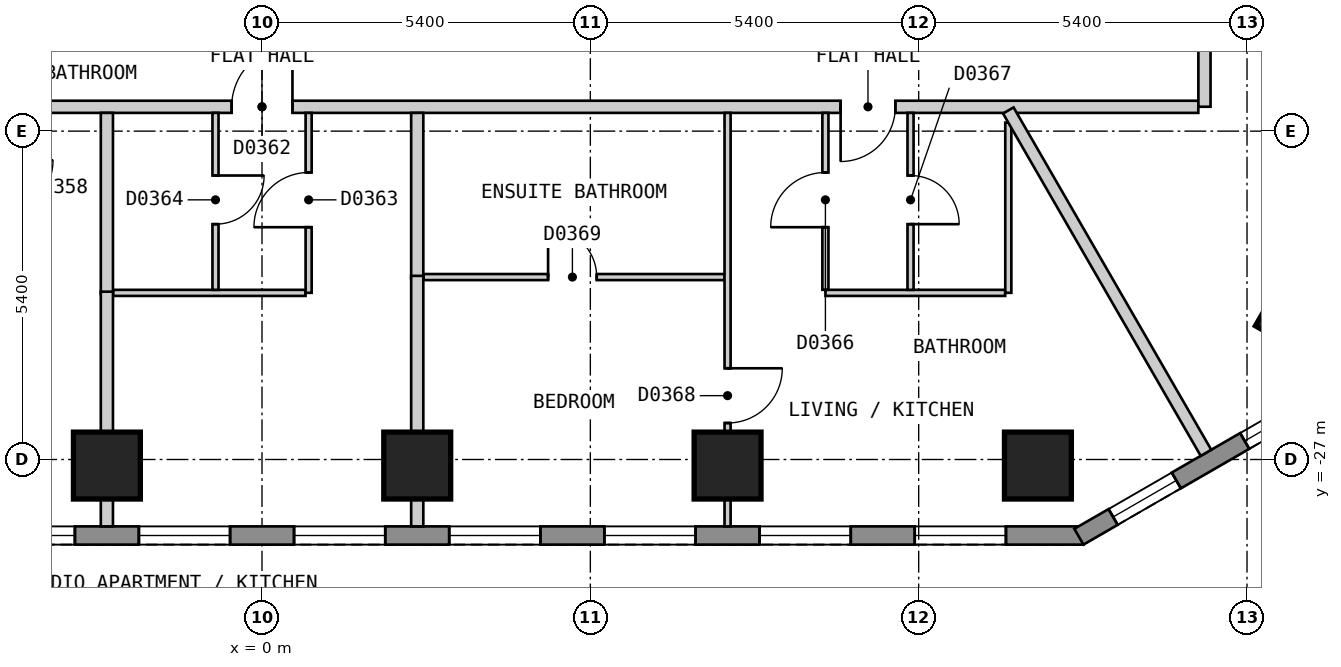
"""IFC4 building model, lengths in metres.
Left out: names, types, materials, properties, quantities, classifications, styles, units other than length and angle.
Written with IfcOpenShell. Run it as: python <this file> out.ifc"""

import sys

from ifc_helpers import new_model, si_unit, direction, frame, frame_2d, origin, origin_2d, place, context, subcontext, project, spatial, polyline, rectangle, outline, extrude, element, fill, save


model = new_model("IFC4")
c1 = context("Model", 3, precision=1e-05, world=origin(), true_north=direction((0.0, 1.0)))
c2 = subcontext(c1, "Body", "Model", "MODEL_VIEW")
j1 = project(units=[si_unit("LENGTHUNIT", "METRE"), si_unit("PLANEANGLEUNIT", "RADIAN")], contexts=[c1])
p1 = place(None, origin())
s1 = spatial("IfcSite", under=j1, at=p1, CompositionType="ELEMENT")
p2 = place(p1, origin())
s2 = spatial("IfcBuilding", under=s1, at=p2, CompositionType="ELEMENT")
p3 = place(p2, frame((0.0, 0.0, 59.4)))
s3 = spatial("IfcBuildingStorey", under=s2, at=p3, CompositionType="ELEMENT", Elevation=59.4)
for number, where, z_axis, x_axis in (
    (1, (-2.551, -27.1, 0.0), (0.0, 0.0, 1.0), (1.0, 0.0, 0.0)),
    (2, (2.553, -27.1, 0.0), (0.0, 0.0, 1.0), (1.0, 0.0, 0.0)),
    (3, (7.657, -27.1, 0.0), (0.0, 0.0, 1.0), (1.0, 0.0, 0.0)),
    (4, (12.761, -27.1, 0.0), (0.0, 0.0, 1.0), (1.0, 0.0, 0.0)),
    (5, (17.09, -24.6, 0.0), (0.0, 0.0, 1.0), (0.5, 0.866, 0.0)),
):
    element("IfcColumn", number, at=place(p3, frame(where, z_axis=z_axis, x_axis=x_axis)), inside=s3, PredefinedType="COLUMN", context=c2, shape_type="SweptSolid", body=[
        extrude(rectangle(XDim=1.1, YDim=1.1, at=origin_2d()), origin(), (0.0, 0.0, 1.0), 3.0),
    ])
p4 = place(p3, frame((-13.51, -28.25, 0.0), z_axis=(0.0, 0.0, 1.0), x_axis=(1.0, 0.0, 0.0)))
e6 = element("IfcWall", 6, at=p4, inside=s3, PredefinedType="SOLIDWALL", context=c2, shape_type="SweptSolid", body=[
    extrude(outline(polyline([(0.0, -0.15), (27.02, -0.15), (26.94, 0.15), (0.08, 0.15), (0.0, -0.15)])), origin(), (0.0, 0.0, 1.0), 2.6),
])
p5 = place(p4, frame((1.277, 0.0, 0.15)))
e7 = element("IfcOpeningElement", 7, at=p5, cuts=e6, PredefinedType="OPENING", context=c2, shape_type="SweptSolid", body=[
    extrude(rectangle(XDim=1.5, YDim=2.1, at=frame_2d((0.75, 1.05))), frame((0.0, 0.16, 0.0), z_axis=(0.0, -1.0, 0.0), x_axis=(1.0, 0.0, 0.0)), (0.0, 0.0, 1.0), 0.32),
])
p6 = place(p4, frame((3.829, 0.0, 0.15)))
e8 = element("IfcOpeningElement", 8, at=p6, cuts=e6, PredefinedType="OPENING", context=c2, shape_type="SweptSolid", body=[
    extrude(rectangle(XDim=1.5, YDim=2.1, at=frame_2d((0.75, 1.05))), frame((0.0, 0.16, 0.0), z_axis=(0.0, -1.0, 0.0), x_axis=(1.0, 0.0, 0.0)), (0.0, 0.0, 1.0), 0.32),
])
p7 = place(p4, frame((6.381, 0.0, 0.15)))
e9 = element("IfcOpeningElement", 9, at=p7, cuts=e6, PredefinedType="OPENING", context=c2, shape_type="SweptSolid", body=[
    extrude(rectangle(XDim=1.5, YDim=2.1, at=frame_2d((0.75, 1.05))), frame((0.0, 0.16, 0.0), z_axis=(0.0, -1.0, 0.0), x_axis=(1.0, 0.0, 0.0)), (0.0, 0.0, 1.0), 0.32),
])
p8 = place(p4, frame((8.933, 0.0, 0.15)))
e10 = element("IfcOpeningElement", 10, at=p8, cuts=e6, PredefinedType="OPENING", context=c2, shape_type="SweptSolid", body=[
    extrude(rectangle(XDim=1.5, YDim=2.1, at=frame_2d((0.75, 1.05))), frame((0.0, 0.16, 0.0), z_axis=(0.0, -1.0, 0.0), x_axis=(1.0, 0.0, 0.0)), (0.0, 0.0, 1.0), 0.32),
])
p9 = place(p4, frame((11.485, 0.0, 0.15)))
e11 = element("IfcOpeningElement", 11, at=p9, cuts=e6, PredefinedType="OPENING", context=c2, shape_type="SweptSolid", body=[
    extrude(rectangle(XDim=1.5, YDim=2.1, at=frame_2d((0.75, 1.05))), frame((0.0, 0.16, 0.0), z_axis=(0.0, -1.0, 0.0), x_axis=(1.0, 0.0, 0.0)), (0.0, 0.0, 1.0), 0.32),
])
p10 = place(p4, frame((14.037, 0.0, 0.15)))
e12 = element("IfcOpeningElement", 12, at=p10, cuts=e6, PredefinedType="OPENING", context=c2, shape_type="SweptSolid", body=[
    extrude(rectangle(XDim=1.5, YDim=2.1, at=frame_2d((0.75, 1.05))), frame((0.0, 0.16, 0.0), z_axis=(0.0, -1.0, 0.0), x_axis=(1.0, 0.0, 0.0)), (0.0, 0.0, 1.0), 0.32),
])
p11 = place(p4, frame((16.589, 0.0, 0.15)))
e13 = element("IfcOpeningElement", 13, at=p11, cuts=e6, PredefinedType="OPENING", context=c2, shape_type="SweptSolid", body=[
    extrude(rectangle(XDim=1.5, YDim=2.1, at=frame_2d((0.75, 1.05))), frame((0.0, 0.16, 0.0), z_axis=(0.0, -1.0, 0.0), x_axis=(1.0, 0.0, 0.0)), (0.0, 0.0, 1.0), 0.32),
])
p12 = place(p4, frame((19.141, 0.0, 0.15)))
e14 = element("IfcOpeningElement", 14, at=p12, cuts=e6, PredefinedType="OPENING", context=c2, shape_type="SweptSolid", body=[
    extrude(rectangle(XDim=1.5, YDim=2.1, at=frame_2d((0.75, 1.05))), frame((0.0, 0.16, 0.0), z_axis=(0.0, -1.0, 0.0), x_axis=(1.0, 0.0, 0.0)), (0.0, 0.0, 1.0), 0.32),
])
p13 = place(p4, frame((21.693, 0.0, 0.15)))
e15 = element("IfcOpeningElement", 15, at=p13, cuts=e6, PredefinedType="OPENING", context=c2, shape_type="SweptSolid", body=[
    extrude(rectangle(XDim=1.5, YDim=2.1, at=frame_2d((0.75, 1.05))), frame((0.0, 0.16, 0.0), z_axis=(0.0, -1.0, 0.0), x_axis=(1.0, 0.0, 0.0)), (0.0, 0.0, 1.0), 0.32),
])
p14 = place(p4, frame((24.245, 0.0, 0.15)))
e16 = element("IfcOpeningElement", 16, at=p14, cuts=e6, PredefinedType="OPENING", context=c2, shape_type="SweptSolid", body=[
    extrude(rectangle(XDim=1.5, YDim=2.1, at=frame_2d((0.75, 1.05))), frame((0.0, 0.16, 0.0), z_axis=(0.0, -1.0, 0.0), x_axis=(1.0, 0.0, 0.0)), (0.0, 0.0, 1.0), 0.32),
])
p15 = place(p3, frame((13.435, -28.27, 0.0), z_axis=(0.0, 0.0, 1.0), x_axis=(0.866010750942, 0.50002537861, 0.0)))
e17 = element("IfcWall", 17, at=p15, inside=s3, PredefinedType="SOLIDWALL", context=c2, shape_type="SweptSolid", body=[
    extrude(outline(polyline([(0.0, -0.15), (5.0, -0.15), (4.919, 0.15), (0.08, 0.15), (0.0, -0.15)])), origin(), (0.0, 0.0, 1.0), 2.6),
])
p16 = place(p15, frame((0.65, 0.0, 0.15)))
e18 = element("IfcOpeningElement", 18, at=p16, cuts=e17, PredefinedType="OPENING", context=c2, shape_type="SweptSolid", body=[
    extrude(rectangle(XDim=1.2, YDim=2.1, at=frame_2d((0.6, 1.05))), frame((0.0, 0.16, 0.0), z_axis=(0.0, -1.0, 0.0), x_axis=(1.0, 0.0, 0.0)), (0.0, 0.0, 1.0), 0.32),
])
p17 = place(p15, frame((3.149, 0.0, 0.15)))
e19 = element("IfcOpeningElement", 19, at=p17, cuts=e17, PredefinedType="OPENING", context=c2, shape_type="SweptSolid", body=[
    extrude(rectangle(XDim=1.2, YDim=2.1, at=frame_2d((0.6, 1.05))), frame((0.0, 0.16, 0.0), z_axis=(0.0, -1.0, 0.0), x_axis=(1.0, 0.0, 0.0)), (0.0, 0.0, 1.0), 0.32),
])
p18 = place(p3, frame((-15.4, -21.2, 0.0), z_axis=(0.0, 0.0, 1.0), x_axis=(1.0, 0.0, 0.0)))
e20 = element("IfcWall", 20, at=p18, inside=s3, PredefinedType="PARTITIONING", context=c2, shape_type="SweptSolid", body=[
    extrude(rectangle(XDim=30.799, YDim=0.2, at=frame_2d((15.399, 0.0))), origin(), (0.0, 0.0, 1.0), 2.6),
])
p19 = place(p18, frame((9.797, 0.0, 0.0)))
e21 = element("IfcOpeningElement", 21, at=p19, cuts=e20, PredefinedType="OPENING", context=c2, shape_type="SweptSolid", body=[
    extrude(rectangle(XDim=1.0, YDim=2.1, at=frame_2d((0.5, 1.05))), frame((0.0, 0.11, 0.0), z_axis=(0.0, -1.0, 0.0), x_axis=(1.0, 0.0, 0.0)), (0.0, 0.0, 1.0), 0.22),
])
p20 = place(p18, frame((14.901, 0.0, 0.0)))
e22 = element("IfcOpeningElement", 22, at=p20, cuts=e20, PredefinedType="OPENING", context=c2, shape_type="SweptSolid", body=[
    extrude(rectangle(XDim=1.0, YDim=2.1, at=frame_2d((0.5, 1.05))), frame((0.0, 0.11, 0.0), z_axis=(0.0, -1.0, 0.0), x_axis=(1.0, 0.0, 0.0)), (0.0, 0.0, 1.0), 0.22),
])
p21 = place(p18, frame((24.916, 0.0, 0.0)))
e23 = element("IfcOpeningElement", 23, at=p21, cuts=e20, PredefinedType="OPENING", context=c2, shape_type="SweptSolid", body=[
    extrude(rectangle(XDim=0.9, YDim=2.1, at=frame_2d((0.45, 1.05))), frame((0.0, 0.11, 0.0), z_axis=(0.0, -1.0, 0.0), x_axis=(1.0, 0.0, 0.0)), (0.0, 0.0, 1.0), 0.22),
])
p22 = place(p3, frame((15.5, -21.199, 0.0), z_axis=(0.0, 0.0, 1.0), x_axis=(0.0, 1.0, 0.0)))
e24 = element("IfcWall", 24, at=p22, inside=s3, PredefinedType="PARTITIONING", context=c2, shape_type="SweptSolid", body=[
    extrude(rectangle(XDim=7.575, YDim=0.2, at=frame_2d((3.788, 0.0))), origin(), (0.0, 0.0, 1.0), 2.6),
])
p23 = place(p22, frame((1.288, 0.0, 0.0)))
e25 = element("IfcOpeningElement", 25, at=p23, cuts=e24, PredefinedType="OPENING", context=c2, shape_type="SweptSolid", body=[
    extrude(rectangle(XDim=0.8, YDim=2.1, at=frame_2d((0.4, 1.05))), frame((0.0, 0.11, 0.0), z_axis=(0.0, -1.0, 0.0), x_axis=(1.0, 0.0, 0.0)), (0.0, 0.0, 1.0), 0.22),
])
p24 = place(p3, frame((9.266, -21.3, 0.0), z_axis=(0.0, 0.0, 1.0), x_axis=(0.0, -1.0, 0.0)))
e26 = element("IfcWall", 26, at=p24, inside=s3, PredefinedType="PARTITIONING", context=c2, shape_type="SweptSolid", body=[
    extrude(rectangle(XDim=2.909, YDim=0.1, at=frame_2d((1.455, 0.0))), origin(), (0.0, 0.0, 1.0), 2.6),
])
p25 = place(p24, frame((0.98, 0.0, 0.0)))
e27 = element("IfcOpeningElement", 27, at=p25, cuts=e26, PredefinedType="OPENING", context=c2, shape_type="SweptSolid", body=[
    extrude(rectangle(XDim=0.9, YDim=2.1, at=frame_2d((0.45, 1.05))), frame((0.0, 0.06, 0.0), z_axis=(0.0, -1.0, 0.0), x_axis=(1.0, 0.0, 0.0)), (0.0, 0.0, 1.0), 0.12),
])
p26 = place(p3, frame((2.653, -24.0, 0.0), z_axis=(0.0, 0.0, 1.0), x_axis=(1.0, 0.0, 0.0)))
e28 = element("IfcWall", 28, at=p26, inside=s3, PredefinedType="PARTITIONING", context=c2, shape_type="SweptSolid", body=[
    extrude(rectangle(XDim=4.954, YDim=0.1, at=frame_2d((2.477, 0.0))), origin(), (0.0, 0.0, 1.0), 2.6),
])
p27 = place(p26, frame((2.052, 0.0, 0.0)))
e29 = element("IfcOpeningElement", 29, at=p27, cuts=e28, PredefinedType="OPENING", context=c2, shape_type="SweptSolid", body=[
    extrude(rectangle(XDim=0.8, YDim=2.1, at=frame_2d((0.4, 1.05))), frame((0.0, 0.06, 0.0), z_axis=(0.0, -1.0, 0.0), x_axis=(1.0, 0.0, 0.0)), (0.0, 0.0, 1.0), 0.12),
])
p28 = place(p3, frame((-2.451, -24.26, 0.0), z_axis=(0.0, 0.0, 1.0), x_axis=(1.0, 0.0, 0.0)))
e30 = element("IfcWall", 30, at=p28, inside=s3, PredefinedType="PARTITIONING", context=c2, shape_type="SweptSolid", body=[
    extrude(rectangle(XDim=3.167, YDim=0.1, at=frame_2d((1.583, 0.0))), origin(), (0.0, 0.0, 1.0), 2.6),
])
p29 = place(p3, frame((9.267, -24.26, 0.0), z_axis=(0.0, 0.0, 1.0), x_axis=(1.0, 0.0, 0.0)))
e31 = element("IfcWall", 31, at=p29, inside=s3, PredefinedType="PARTITIONING", context=c2, shape_type="SweptSolid", body=[
    extrude(rectangle(XDim=2.956, YDim=0.1, at=frame_2d((1.478, 0.0))), origin(), (0.0, 0.0, 1.0), 2.6),
])
p30 = place(p3, frame((7.657, -28.1, 0.0), z_axis=(0.0, 0.0, 1.0), x_axis=(0.0, 1.0, 0.0)))
e32 = element("IfcWall", 32, at=p30, inside=s3, PredefinedType="PARTITIONING", context=c2, shape_type="SweptSolid", body=[
    extrude(rectangle(XDim=6.8, YDim=0.1, at=frame_2d((3.4, 0.0))), origin(), (0.0, 0.0, 1.0), 2.6),
])
p31 = place(p30, frame((1.7, 0.0, 0.0)))
e33 = element("IfcOpeningElement", 33, at=p31, cuts=e32, PredefinedType="OPENING", context=c2, shape_type="SweptSolid", body=[
    extrude(rectangle(XDim=0.9, YDim=2.1, at=frame_2d((0.45, 1.05))), frame((0.0, 0.06, 0.0), z_axis=(0.0, -1.0, 0.0), x_axis=(1.0, 0.0, 0.0)), (0.0, 0.0, 1.0), 0.12),
])
p32 = place(p3, frame((0.767, -24.259, 0.0), z_axis=(0.0, 0.0, 1.0), x_axis=(0.0, 1.0, 0.0)))
e34 = element("IfcWall", 34, at=p32, inside=s3, PredefinedType="PARTITIONING", context=c2, shape_type="SweptSolid", body=[
    extrude(rectangle(XDim=2.959, YDim=0.1, at=frame_2d((1.479, 0.0))), origin(), (0.0, 0.0, 1.0), 2.6),
])
p33 = place(p32, frame((1.079, 0.0, 0.0)))
e35 = element("IfcOpeningElement", 35, at=p33, cuts=e34, PredefinedType="OPENING", context=c2, shape_type="SweptSolid", body=[
    extrude(rectangle(XDim=0.9, YDim=2.1, at=frame_2d((0.45, 1.05))), frame((0.0, 0.06, 0.0), z_axis=(0.0, -1.0, 0.0), x_axis=(1.0, 0.0, 0.0)), (0.0, 0.0, 1.0), 0.12),
])
p34 = place(p3, frame((10.666, -24.21, 0.0), z_axis=(0.0, 0.0, 1.0), x_axis=(0.0, 1.0, 0.0)))
e36 = element("IfcWall", 36, at=p34, inside=s3, PredefinedType="PARTITIONING", context=c2, shape_type="SweptSolid", body=[
    extrude(rectangle(XDim=2.91, YDim=0.1, at=frame_2d((1.455, 0.0))), origin(), (0.0, 0.0, 1.0), 2.6),
])
p35 = place(p34, frame((1.08, 0.0, 0.0)))
e37 = element("IfcOpeningElement", 37, at=p35, cuts=e36, PredefinedType="OPENING", context=c2, shape_type="SweptSolid", body=[
    extrude(rectangle(XDim=0.8, YDim=2.1, at=frame_2d((0.4, 1.05))), frame((0.0, 0.06, 0.0), z_axis=(0.0, -1.0, 0.0), x_axis=(1.0, 0.0, 0.0)), (0.0, 0.0, 1.0), 0.12),
])
p36 = place(p3, frame((12.274, -24.259, 0.0), z_axis=(0.0, 0.0, 1.0), x_axis=(0.0, 1.0, 0.0)))
e38 = element("IfcWall", 38, at=p36, inside=s3, PredefinedType="PARTITIONING", context=c2, shape_type="SweptSolid", body=[
    extrude(rectangle(XDim=2.799, YDim=0.1, at=frame_2d((1.399, 0.0))), origin(), (0.0, 0.0, 1.0), 2.6),
])
p37 = place(p3, frame((-0.765, -24.21, 0.0), z_axis=(0.0, 0.0, 1.0), x_axis=(0.0, 1.0, 0.0)))
e39 = element("IfcWall", 39, at=p37, inside=s3, PredefinedType="PARTITIONING", context=c2, shape_type="SweptSolid", body=[
    extrude(rectangle(XDim=2.91, YDim=0.1, at=frame_2d((1.455, 0.0))), origin(), (0.0, 0.0, 1.0), 2.6),
])
p38 = place(p37, frame((1.08, 0.0, 0.0)))
e40 = element("IfcOpeningElement", 40, at=p38, cuts=e39, PredefinedType="OPENING", context=c2, shape_type="SweptSolid", body=[
    extrude(rectangle(XDim=0.8, YDim=2.1, at=frame_2d((0.4, 1.05))), frame((0.0, 0.06, 0.0), z_axis=(0.0, -1.0, 0.0), x_axis=(1.0, 0.0, 0.0)), (0.0, 0.0, 1.0), 0.12),
])
p39 = place(p3, frame((12.274, -21.26, 0.0), z_axis=(0.0, 0.0, 1.0), x_axis=(0.500064857354, -0.865987955135, 0.0)))
e41 = element("IfcWall", 41, at=p39, inside=s3, PredefinedType="PARTITIONING", context=c2, shape_type="SweptSolid", body=[
    extrude(rectangle(XDim=6.501, YDim=0.2, at=frame_2d((3.25, 0.0))), origin(), (0.0, 0.0, 1.0), 2.6),
])
p40 = place(p3, frame((-2.551, -21.3, 0.0), z_axis=(0.0, 0.0, 1.0), x_axis=(0.0, -1.0, 0.0)))
e42 = element("IfcWall", 42, at=p40, inside=s3, PredefinedType="PARTITIONING", context=c2, shape_type="SweptSolid", body=[
    extrude(rectangle(XDim=2.98, YDim=0.2, at=frame_2d((1.49, 0.0))), origin(), (0.0, 0.0, 1.0), 2.6),
])
p41 = place(p3, frame((2.553, -21.3, 0.0), z_axis=(0.0, 0.0, 1.0), x_axis=(0.0, -1.0, 0.0)))
e43 = element("IfcWall", 43, at=p41, inside=s3, PredefinedType="PARTITIONING", context=c2, shape_type="SweptSolid", body=[
    extrude(rectangle(XDim=2.72, YDim=0.2, at=frame_2d((1.36, 0.0))), origin(), (0.0, 0.0, 1.0), 2.6),
])
p42 = place(p3, frame((15.6, -17.846, 0.0), z_axis=(0.0, 0.0, 1.0), x_axis=(0.866071523686, -0.499920109479, 0.0)))
e44 = element("IfcWall", 44, at=p42, inside=s3, PredefinedType="PARTITIONING", context=c2, shape_type="SweptSolid", body=[
    extrude(rectangle(XDim=5.667, YDim=0.2, at=frame_2d((2.833, 0.0))), origin(), (0.0, 0.0, 1.0), 2.6),
])
p43 = place(p3, frame((2.553, -28.1, 0.0), z_axis=(0.0, 0.0, 1.0), x_axis=(0.0, 1.0, 0.0)))
e45 = element("IfcWall", 45, at=p43, inside=s3, PredefinedType="PARTITIONING", context=c2, shape_type="SweptSolid", body=[
    extrude(rectangle(XDim=4.12, YDim=0.2, at=frame_2d((2.06, 0.0))), origin(), (0.0, 0.0, 1.0), 2.6),
])
p44 = place(p3, frame((-2.551, -28.1, 0.0), z_axis=(0.0, 0.0, 1.0), x_axis=(0.0, 1.0, 0.0)))
e46 = element("IfcWall", 46, at=p44, inside=s3, PredefinedType="PARTITIONING", context=c2, shape_type="SweptSolid", body=[
    extrude(rectangle(XDim=3.86, YDim=0.2, at=frame_2d((1.93, 0.0))), origin(), (0.0, 0.0, 1.0), 2.6),
])
p45 = place(p8, origin())
e47 = element("IfcWindow", 47, at=p45, inside=s3, PartitioningType="SINGLE_PANEL", PredefinedType="WINDOW", context=c2, shape_type="SweptSolid", body=[
    extrude(rectangle(XDim=1.5, YDim=2.1, at=frame_2d((0.75, 1.05))), frame((0.0, 0.03, 0.0), z_axis=(0.0, -1.0, 0.0), x_axis=(1.0, 0.0, 0.0)), (0.0, 0.0, 1.0), 0.06),
])
fill(e10, e47)
p46 = place(p9, origin())
e48 = element("IfcWindow", 48, at=p46, inside=s3, PartitioningType="SINGLE_PANEL", PredefinedType="WINDOW", context=c2, shape_type="SweptSolid", body=[
    extrude(rectangle(XDim=1.5, YDim=2.1, at=frame_2d((0.75, 1.05))), frame((0.0, 0.03, 0.0), z_axis=(0.0, -1.0, 0.0), x_axis=(1.0, 0.0, 0.0)), (0.0, 0.0, 1.0), 0.06),
])
fill(e11, e48)
p47 = place(p10, origin())
e49 = element("IfcWindow", 49, at=p47, inside=s3, PartitioningType="SINGLE_PANEL", PredefinedType="WINDOW", context=c2, shape_type="SweptSolid", body=[
    extrude(rectangle(XDim=1.5, YDim=2.1, at=frame_2d((0.75, 1.05))), frame((0.0, 0.03, 0.0), z_axis=(0.0, -1.0, 0.0), x_axis=(1.0, 0.0, 0.0)), (0.0, 0.0, 1.0), 0.06),
])
fill(e12, e49)
p48 = place(p11, origin())
e50 = element("IfcWindow", 50, at=p48, inside=s3, PartitioningType="SINGLE_PANEL", PredefinedType="WINDOW", context=c2, shape_type="SweptSolid", body=[
    extrude(rectangle(XDim=1.5, YDim=2.1, at=frame_2d((0.75, 1.05))), frame((0.0, 0.03, 0.0), z_axis=(0.0, -1.0, 0.0), x_axis=(1.0, 0.0, 0.0)), (0.0, 0.0, 1.0), 0.06),
])
fill(e13, e50)
p49 = place(p12, origin())
e51 = element("IfcWindow", 51, at=p49, inside=s3, PartitioningType="SINGLE_PANEL", PredefinedType="WINDOW", context=c2, shape_type="SweptSolid", body=[
    extrude(rectangle(XDim=1.5, YDim=2.1, at=frame_2d((0.75, 1.05))), frame((0.0, 0.03, 0.0), z_axis=(0.0, -1.0, 0.0), x_axis=(1.0, 0.0, 0.0)), (0.0, 0.0, 1.0), 0.06),
])
fill(e14, e51)
p50 = place(p13, origin())
e52 = element("IfcWindow", 52, at=p50, inside=s3, PartitioningType="SINGLE_PANEL", PredefinedType="WINDOW", context=c2, shape_type="SweptSolid", body=[
    extrude(rectangle(XDim=1.5, YDim=2.1, at=frame_2d((0.75, 1.05))), frame((0.0, 0.03, 0.0), z_axis=(0.0, -1.0, 0.0), x_axis=(1.0, 0.0, 0.0)), (0.0, 0.0, 1.0), 0.06),
])
fill(e15, e52)
p51 = place(p14, origin())
e53 = element("IfcWindow", 53, at=p51, inside=s3, PartitioningType="SINGLE_PANEL", PredefinedType="WINDOW", context=c2, shape_type="SweptSolid", body=[
    extrude(rectangle(XDim=1.5, YDim=2.1, at=frame_2d((0.75, 1.05))), frame((0.0, 0.03, 0.0), z_axis=(0.0, -1.0, 0.0), x_axis=(1.0, 0.0, 0.0)), (0.0, 0.0, 1.0), 0.06),
])
fill(e16, e53)
p52 = place(p16, origin())
e54 = element("IfcWindow", 54, at=p52, inside=s3, PartitioningType="SINGLE_PANEL", PredefinedType="WINDOW", context=c2, shape_type="SweptSolid", body=[
    extrude(rectangle(XDim=1.2, YDim=2.1, at=frame_2d((0.6, 1.05))), frame((0.0, 0.03, 0.0), z_axis=(0.0, -1.0, 0.0), x_axis=(1.0, 0.0, 0.0)), (0.0, 0.0, 1.0), 0.06),
])
fill(e18, e54)
p53 = place(p17, origin())
e55 = element("IfcWindow", 55, at=p53, inside=s3, PartitioningType="SINGLE_PANEL", PredefinedType="WINDOW", context=c2, shape_type="SweptSolid", body=[
    extrude(rectangle(XDim=1.2, YDim=2.1, at=frame_2d((0.6, 1.05))), frame((0.0, 0.03, 0.0), z_axis=(0.0, -1.0, 0.0), x_axis=(1.0, 0.0, 0.0)), (0.0, 0.0, 1.0), 0.06),
])
fill(e19, e55)
p54 = place(p20, origin())
e56 = element("IfcDoor", 56, at=p54, inside=s3, OperationType="SINGLE_SWING_RIGHT", PredefinedType="DOOR", context=c2, shape_type="SweptSolid", body=[
    extrude(rectangle(XDim=1.0, YDim=2.1, at=frame_2d((0.5, 1.05))), frame((0.0, 0.025, 0.0), z_axis=(0.0, -1.0, 0.0), x_axis=(1.0, 0.0, 0.0)), (0.0, 0.0, 1.0), 0.05),
])
fill(e22, e56)
p55 = place(p33, origin())
e57 = element("IfcDoor", 57, at=p55, inside=s3, OperationType="SINGLE_SWING_LEFT", PredefinedType="DOOR", context=c2, shape_type="SweptSolid", body=[
    extrude(rectangle(XDim=0.9, YDim=2.1, at=frame_2d((0.45, 1.05))), frame((0.0, 0.025, 0.0), z_axis=(0.0, -1.0, 0.0), x_axis=(1.0, 0.0, 0.0)), (0.0, 0.0, 1.0), 0.05),
])
fill(e35, e57)
p56 = place(p38, origin())
e58 = element("IfcDoor", 58, at=p56, inside=s3, OperationType="SINGLE_SWING_RIGHT", PredefinedType="DOOR", context=c2, shape_type="SweptSolid", body=[
    extrude(rectangle(XDim=0.8, YDim=2.1, at=frame_2d((0.4, 1.05))), frame((0.0, 0.025, 0.0), z_axis=(0.0, -1.0, 0.0), x_axis=(1.0, 0.0, 0.0)), (0.0, 0.0, 1.0), 0.05),
])
fill(e40, e58)
p57 = place(p21, origin())
e59 = element("IfcDoor", 59, at=p57, inside=s3, OperationType="SINGLE_SWING_LEFT", PredefinedType="DOOR", context=c2, shape_type="SweptSolid", body=[
    extrude(rectangle(XDim=0.9, YDim=2.1, at=frame_2d((0.45, 1.05))), frame((0.0, 0.025, 0.0), z_axis=(0.0, -1.0, 0.0), x_axis=(1.0, 0.0, 0.0)), (0.0, 0.0, 1.0), 0.05),
])
fill(e23, e59)
p58 = place(p25, origin())
e60 = element("IfcDoor", 60, at=p58, inside=s3, OperationType="SINGLE_SWING_RIGHT", PredefinedType="DOOR", context=c2, shape_type="SweptSolid", body=[
    extrude(rectangle(XDim=0.9, YDim=2.1, at=frame_2d((0.45, 1.05))), frame((0.0, 0.025, 0.0), z_axis=(0.0, -1.0, 0.0), x_axis=(1.0, 0.0, 0.0)), (0.0, 0.0, 1.0), 0.05),
])
fill(e27, e60)
p59 = place(p35, origin())
e61 = element("IfcDoor", 61, at=p59, inside=s3, OperationType="SINGLE_SWING_LEFT", PredefinedType="DOOR", context=c2, shape_type="SweptSolid", body=[
    extrude(rectangle(XDim=0.8, YDim=2.1, at=frame_2d((0.4, 1.05))), frame((0.0, 0.025, 0.0), z_axis=(0.0, -1.0, 0.0), x_axis=(1.0, 0.0, 0.0)), (0.0, 0.0, 1.0), 0.05),
])
fill(e37, e61)
p60 = place(p31, origin())
e62 = element("IfcDoor", 62, at=p60, inside=s3, OperationType="SINGLE_SWING_RIGHT", PredefinedType="DOOR", context=c2, shape_type="SweptSolid", body=[
    extrude(rectangle(XDim=0.9, YDim=2.1, at=frame_2d((0.45, 1.05))), frame((0.0, 0.025, 0.0), z_axis=(0.0, -1.0, 0.0), x_axis=(1.0, 0.0, 0.0)), (0.0, 0.0, 1.0), 0.05),
])
fill(e33, e62)
p61 = place(p27, origin())
e63 = element("IfcDoor", 63, at=p61, inside=s3, OperationType="SINGLE_SWING_LEFT", PredefinedType="DOOR", context=c2, shape_type="SweptSolid", body=[
    extrude(rectangle(XDim=0.8, YDim=2.1, at=frame_2d((0.4, 1.05))), frame((0.0, 0.025, 0.0), z_axis=(0.0, -1.0, 0.0), x_axis=(1.0, 0.0, 0.0)), (0.0, 0.0, 1.0), 0.05),
])
fill(e29, e63)
save(model, sys.argv[1])
